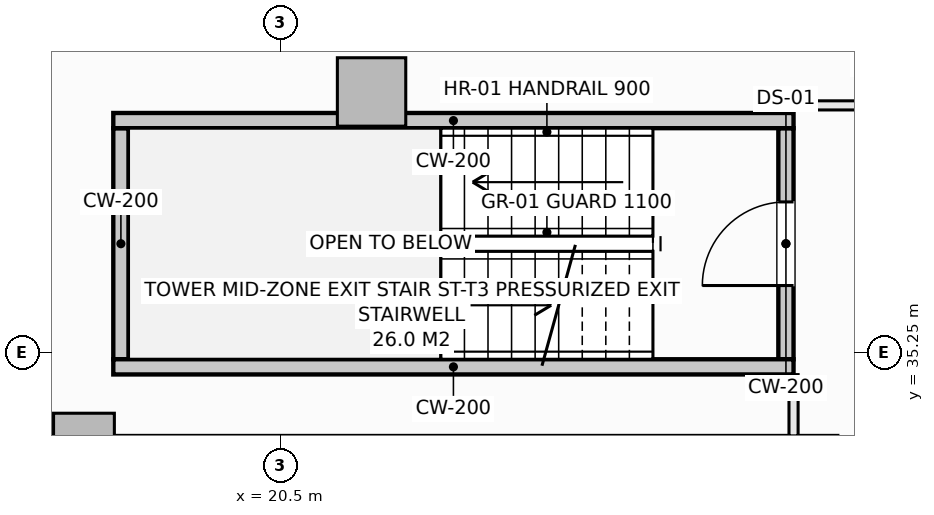
"""IFC4 building model, lengths in metres.
Left out: names, types, materials, properties, quantities, classifications, styles, units other than length and angle.
Written with IfcOpenShell. Run it as: python <this file> out.ifc"""

import sys

from ifc_helpers import new_model, si_unit, direction, frame, frame_2d, origin, origin_2d, place, context, subcontext, project, spatial, rectangle, extrude, element, fill, save


model = new_model("IFC4")
c1 = context("Model", 3, precision=1e-05, world=origin(), true_north=direction((0.0, 1.0)))
c2 = subcontext(c1, "Body", "Model", "MODEL_VIEW")
j1 = project(units=[si_unit("LENGTHUNIT", "METRE"), si_unit("PLANEANGLEUNIT", "RADIAN")], contexts=[c1])
p1 = place(None, origin())
s1 = spatial("IfcSite", under=j1, at=p1, CompositionType="ELEMENT")
p2 = place(p1, origin())
s2 = spatial("IfcBuilding", under=s1, at=p2, CompositionType="ELEMENT")
p3 = place(p2, frame((0.0, 0.0, 166.5)))
s3 = spatial("IfcBuildingStorey", under=s2, at=p3, CompositionType="ELEMENT", Elevation=166.5)
p4 = place(p3, frame((21.698, 38.677, -0.27), z_axis=(0.0, 0.0, 1.0), x_axis=(1.0, 0.0, 0.0)))
e1 = element("IfcColumn", 1, at=p4, inside=s3, PredefinedType="COLUMN", context=c2, shape_type="SweptSolid", body=[
    extrude(rectangle(XDim=0.9, YDim=0.9, at=origin_2d()), origin(), (0.0, 0.0, 1.0), 3.4),
])
p5 = place(p3, frame((17.914, 34.05, -0.27), z_axis=(0.0, 0.0, 1.0), x_axis=(1.0, 0.0, 0.0)))
e2 = element("IfcColumn", 2, at=p5, inside=s3, PredefinedType="PILASTER", context=c2, shape_type="SweptSolid", body=[
    extrude(rectangle(XDim=0.8, YDim=0.8, at=origin_2d()), origin(), (0.0, 0.0, 1.0), 3.4),
])
p6 = place(p3, frame((15.937, 38.086, 0.0), z_axis=(0.0, 0.0, 1.0), x_axis=(0.616429245738, 0.787410302828, 0.0)))
e3 = element("IfcWall", 3, at=p6, inside=s3, PredefinedType="SOLIDWALL", context=c2, shape_type="SweptSolid", body=[
    extrude(rectangle(XDim=5.223, YDim=0.3, at=frame_2d((2.612, 0.0))), origin(), (0.0, 0.0, 1.0), 2.653),
])
p7 = place(p6, frame((1.562, 0.0, 0.74)))
e4 = element("IfcOpeningElement", 4, at=p7, cuts=e3, PredefinedType="OPENING", context=c2, shape_type="SweptSolid", body=[
    extrude(rectangle(XDim=2.1, YDim=1.7, at=frame_2d((1.05, 0.85))), frame((0.0, 0.16, 0.0), z_axis=(0.0, -1.0, 0.0), x_axis=(1.0, 0.0, 0.0)), (0.0, 0.0, 1.0), 0.32),
])
p8 = place(p3, frame((27.15, 35.16, -0.27), z_axis=(0.0, 0.0, 1.0), x_axis=(0.0, 1.0, 0.0)))
e5 = element("IfcWall", 5, at=p8, inside=s3, PredefinedType="SHEAR", context=c2, shape_type="SweptSolid", body=[
    extrude(rectangle(XDim=3.04, YDim=0.2, at=frame_2d((1.52, 0.0))), origin(), (0.0, 0.0, 1.0), 3.4),
])
p9 = place(p8, frame((0.97, 0.0, 0.27)))
e6 = element("IfcOpeningElement", 6, at=p9, cuts=e5, PredefinedType="OPENING", context=c2, shape_type="SweptSolid", body=[
    extrude(rectangle(XDim=1.1, YDim=2.15, at=frame_2d((0.55, 1.075))), frame((0.0, 0.11, 0.0), z_axis=(0.0, -1.0, 0.0), x_axis=(1.0, 0.0, 0.0)), (0.0, 0.0, 1.0), 0.22),
])
p10 = place(p3, frame((18.4, 35.16, -0.27), z_axis=(0.0, 0.0, 1.0), x_axis=(0.0, 1.0, 0.0)))
e7 = element("IfcWall", 7, at=p10, inside=s3, PredefinedType="SHEAR", context=c2, shape_type="SweptSolid", body=[
    extrude(rectangle(XDim=3.04, YDim=0.2, at=frame_2d((1.52, 0.0))), origin(), (0.0, 0.0, 1.0), 3.4),
])
for number, where, z_axis, x_axis in (
    (8, (18.3, 38.3, -0.27), (0.0, 0.0, 1.0), (1.0, 0.0, 0.0)),
    (9, (18.3, 35.06, -0.27), (0.0, 0.0, 1.0), (1.0, 0.0, 0.0)),
):
    element("IfcWall", number, at=place(p3, frame(where, z_axis=z_axis, x_axis=x_axis)), inside=s3, PredefinedType="SHEAR", context=c2, shape_type="SweptSolid", body=[
        extrude(rectangle(XDim=8.95, YDim=0.2, at=frame_2d((4.475, 0.0))), origin(), (0.0, 0.0, 1.0), 3.4),
    ])
p11 = place(p3, frame((27.25, 34.152, 0.0), z_axis=(0.0, 0.0, 1.0), x_axis=(0.0, 1.0, 0.0)))
e10 = element("IfcWall", 10, at=p11, inside=s3, PredefinedType="PARTITIONING", context=c2, shape_type="SweptSolid", body=[
    extrude(rectangle(XDim=0.806, YDim=0.12, at=frame_2d((0.403, 0.0))), origin(), (0.0, 0.0, 1.0), 3.13),
])
p12 = place(p3, frame((27.25, 38.5, 0.0), z_axis=(0.0, 0.0, 1.0), x_axis=(1.0, 0.0, 0.0)))
e11 = element("IfcWall", 11, at=p12, inside=s3, PredefinedType="PARTITIONING", context=c2, shape_type="SweptSolid", body=[
    extrude(rectangle(XDim=2.53, YDim=0.12, at=frame_2d((1.265, 0.0))), origin(), (0.0, 0.0, 1.0), 3.13),
])
p13 = place(p9, origin())
e12 = element("IfcDoor", 12, at=p13, inside=s3, OperationType="SINGLE_SWING_LEFT", PredefinedType="DOOR", context=c2, shape_type="SweptSolid", body=[
    extrude(rectangle(XDim=1.1, YDim=2.15, at=frame_2d((0.55, 1.075))), frame((0.0, 0.025, 0.0), z_axis=(0.0, -1.0, 0.0), x_axis=(1.0, 0.0, 0.0)), (0.0, 0.0, 1.0), 0.05),
])
fill(e6, e12)
save(model, sys.argv[1])
